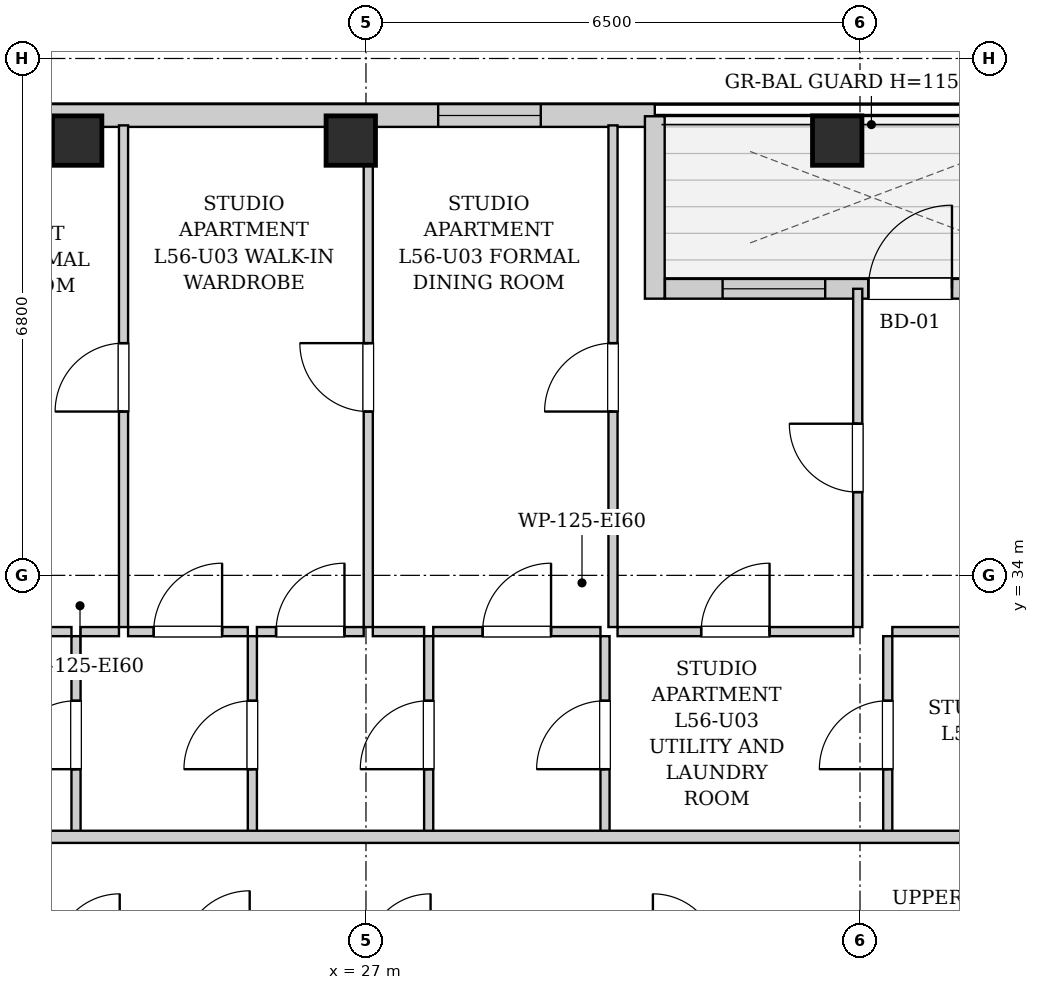
"""IFC4 building model, lengths in metres.
Left out: names, types, materials, properties, quantities, classifications, styles, units other than length and angle.
Written with IfcOpenShell. Run it as: python <this file> out.ifc"""

import sys

from ifc_helpers import new_model, si_unit, direction, frame, frame_2d, origin, origin_2d, place, context, subcontext, project, spatial, rectangle, extrude, element, fill, save


model = new_model("IFC4")
c1 = context("Model", 3, precision=1e-05, world=origin(), true_north=direction((0.0, 1.0)))
c2 = subcontext(c1, "Body", "Model", "MODEL_VIEW")
j1 = project(units=[si_unit("LENGTHUNIT", "METRE"), si_unit("PLANEANGLEUNIT", "RADIAN")], contexts=[c1])
p1 = place(None, origin())
s1 = spatial("IfcSite", under=j1, at=p1, CompositionType="ELEMENT")
p2 = place(p1, origin())
s2 = spatial("IfcBuilding", under=s1, at=p2, CompositionType="ELEMENT")
p3 = place(p2, frame((0.0, 0.0, 194.2)))
s3 = spatial("IfcBuildingStorey", under=s2, at=p3, CompositionType="ELEMENT", Elevation=194.2)
for number, where, z_axis, x_axis in (
    (1, (23.2, 39.72, 0.0), (0.0, 0.0, 1.0), (1.0, 0.0, 0.0)),
    (2, (26.8, 39.72, 0.0), (0.0, 0.0, 1.0), (1.0, 0.0, 0.0)),
    (3, (33.2, 39.72, 0.0), (0.0, 0.0, 1.0), (1.0, 0.0, 0.0)),
):
    element("IfcColumn", number, at=place(p3, frame(where, z_axis=z_axis, x_axis=x_axis)), inside=s3, PredefinedType="COLUMN", context=c2, shape_type="SweptSolid", body=[
        extrude(rectangle(XDim=0.65, YDim=0.65, at=origin_2d()), origin(), (0.0, 0.0, 1.0), 3.3),
    ])
p4 = place(p3, frame((13.1, 40.05, 0.0), z_axis=(0.0, 0.0, 1.0), x_axis=(1.0, 0.0, 0.0)))
e4 = element("IfcWall", 4, at=p4, inside=s3, PredefinedType="SOLIDWALL", context=c2, shape_type="SweptSolid", body=[
    extrude(rectangle(XDim=17.7, YDim=0.3, at=frame_2d((8.85, 0.0))), origin(), (0.0, 0.0, 1.0), 3.04),
])
p5 = place(p4, frame((1.95, 0.0, 0.55)))
e5 = element("IfcOpeningElement", 5, at=p5, cuts=e4, PredefinedType="OPENING", context=c2, shape_type="SweptSolid", body=[
    extrude(rectangle(XDim=1.35, YDim=1.2, at=frame_2d((0.675, 0.6))), frame((0.0, 0.16, 0.0), z_axis=(0.0, -1.0, 0.0), x_axis=(1.0, 0.0, 0.0)), (0.0, 0.0, 1.0), 0.32),
])
p6 = place(p4, frame((5.25, 0.0, 0.55)))
e6 = element("IfcOpeningElement", 6, at=p6, cuts=e4, PredefinedType="OPENING", context=c2, shape_type="SweptSolid", body=[
    extrude(rectangle(XDim=1.35, YDim=1.2, at=frame_2d((0.675, 0.6))), frame((0.0, 0.16, 0.0), z_axis=(0.0, -1.0, 0.0), x_axis=(1.0, 0.0, 0.0)), (0.0, 0.0, 1.0), 0.32),
])
p7 = place(p4, frame((8.05, 0.0, 0.55)))
e7 = element("IfcOpeningElement", 7, at=p7, cuts=e4, PredefinedType="OPENING", context=c2, shape_type="SweptSolid", body=[
    extrude(rectangle(XDim=1.35, YDim=1.2, at=frame_2d((0.675, 0.6))), frame((0.0, 0.16, 0.0), z_axis=(0.0, -1.0, 0.0), x_axis=(1.0, 0.0, 0.0)), (0.0, 0.0, 1.0), 0.32),
])
p8 = place(p4, frame((14.85, 0.0, 0.55)))
e8 = element("IfcOpeningElement", 8, at=p8, cuts=e4, PredefinedType="OPENING", context=c2, shape_type="SweptSolid", body=[
    extrude(rectangle(XDim=1.35, YDim=1.2, at=frame_2d((0.675, 0.6))), frame((0.0, 0.16, 0.0), z_axis=(0.0, -1.0, 0.0), x_axis=(1.0, 0.0, 0.0)), (0.0, 0.0, 1.0), 0.32),
])
p9 = place(p3, frame((30.8, 40.04, 0.0), z_axis=(0.0, 0.0, 1.0), x_axis=(0.0, -1.0, 0.0)))
e9 = element("IfcWall", 9, at=p9, inside=s3, PredefinedType="SOLIDWALL", context=c2, shape_type="SweptSolid", body=[
    extrude(rectangle(XDim=2.4, YDim=0.26, at=frame_2d((1.2, 0.0))), origin(), (0.0, 0.0, 1.0), 3.04),
])
p10 = place(p3, frame((30.934, 37.77, 0.0), z_axis=(0.0, 0.0, 1.0), x_axis=(1.0, 0.0, 0.0)))
e10 = element("IfcWall", 10, at=p10, inside=s3, PredefinedType="SOLIDWALL", context=c2, shape_type="SweptSolid", body=[
    extrude(rectangle(XDim=5.432, YDim=0.26, at=frame_2d((2.716, 0.0))), origin(), (0.0, 0.0, 1.0), 3.04),
])
p11 = place(p10, frame((2.676, 0.0, 0.0)))
e11 = element("IfcOpeningElement", 11, at=p11, cuts=e10, PredefinedType="OPENING", context=c2, shape_type="SweptSolid", body=[
    extrude(rectangle(XDim=1.1, YDim=2.0, at=frame_2d((0.55, 1.0))), frame((0.0, 0.14, 0.0), z_axis=(0.0, -1.0, 0.0), x_axis=(1.0, 0.0, 0.0)), (0.0, 0.0, 1.0), 0.28),
])
p12 = place(p10, frame((0.758, 0.0, 0.55)))
e12 = element("IfcOpeningElement", 12, at=p12, cuts=e10, PredefinedType="OPENING", context=c2, shape_type="SweptSolid", body=[
    extrude(rectangle(XDim=1.35, YDim=1.2, at=frame_2d((0.675, 0.6))), frame((0.0, 0.14, 0.0), z_axis=(0.0, -1.0, 0.0), x_axis=(1.0, 0.0, 0.0)), (0.0, 0.0, 1.0), 0.28),
])
p13 = place(p3, frame((23.185, 30.6, 0.0), z_axis=(0.0, 0.0, 1.0), x_axis=(0.0, 1.0, 0.0)))
e13 = element("IfcWall", 13, at=p13, inside=s3, PredefinedType="PARTITIONING", context=c2, shape_type="SweptSolid", body=[
    extrude(rectangle(XDim=2.6, YDim=0.12, at=frame_2d((1.3, 0.0))), origin(), (0.0, 0.0, 1.0), 3.04),
])
p14 = place(p13, frame((0.85, 0.0, 0.0)))
e14 = element("IfcOpeningElement", 14, at=p14, cuts=e13, PredefinedType="OPENING", context=c2, shape_type="SweptSolid", body=[
    extrude(rectangle(XDim=0.9, YDim=2.05, at=frame_2d((0.45, 1.025))), frame((0.0, 0.07, 0.0), z_axis=(0.0, -1.0, 0.0), x_axis=(1.0, 0.0, 0.0)), (0.0, 0.0, 1.0), 0.14),
])
p15 = place(p3, frame((20.65, 33.26, 0.0), z_axis=(0.0, 0.0, 1.0), x_axis=(1.0, 0.0, 0.0)))
e15 = element("IfcWall", 15, at=p15, inside=s3, PredefinedType="PARTITIONING", context=c2, shape_type="SweptSolid", body=[
    extrude(rectangle(XDim=2.475, YDim=0.12, at=frame_2d((1.238, 0.0))), origin(), (0.0, 0.0, 1.0), 3.04),
])
p16 = place(p15, frame((0.787, 0.0, 0.0)))
e16 = element("IfcOpeningElement", 16, at=p16, cuts=e15, PredefinedType="OPENING", context=c2, shape_type="SweptSolid", body=[
    extrude(rectangle(XDim=0.9, YDim=2.05, at=frame_2d((0.45, 1.025))), frame((0.0, 0.07, 0.0), z_axis=(0.0, -1.0, 0.0), x_axis=(1.0, 0.0, 0.0)), (0.0, 0.0, 1.0), 0.14),
])
p17 = place(p3, frame((25.505, 30.6, 0.0), z_axis=(0.0, 0.0, 1.0), x_axis=(0.0, 1.0, 0.0)))
e17 = element("IfcWall", 17, at=p17, inside=s3, PredefinedType="PARTITIONING", context=c2, shape_type="SweptSolid", body=[
    extrude(rectangle(XDim=2.6, YDim=0.12, at=frame_2d((1.3, 0.0))), origin(), (0.0, 0.0, 1.0), 3.04),
])
p18 = place(p17, frame((0.85, 0.0, 0.0)))
e18 = element("IfcOpeningElement", 18, at=p18, cuts=e17, PredefinedType="OPENING", context=c2, shape_type="SweptSolid", body=[
    extrude(rectangle(XDim=0.9, YDim=2.05, at=frame_2d((0.45, 1.025))), frame((0.0, 0.07, 0.0), z_axis=(0.0, -1.0, 0.0), x_axis=(1.0, 0.0, 0.0)), (0.0, 0.0, 1.0), 0.14),
])
p19 = place(p3, frame((23.245, 33.26, 0.0), z_axis=(0.0, 0.0, 1.0), x_axis=(1.0, 0.0, 0.0)))
e19 = element("IfcWall", 19, at=p19, inside=s3, PredefinedType="PARTITIONING", context=c2, shape_type="SweptSolid", body=[
    extrude(rectangle(XDim=0.505, YDim=0.12, at=frame_2d((0.252, 0.0))), origin(), (0.0, 0.0, 1.0), 3.04),
])
p20 = place(p3, frame((23.87, 33.26, 0.0), z_axis=(0.0, 0.0, 1.0), x_axis=(1.0, 0.0, 0.0)))
e20 = element("IfcWall", 20, at=p20, inside=s3, PredefinedType="PARTITIONING", context=c2, shape_type="SweptSolid", body=[
    extrude(rectangle(XDim=1.575, YDim=0.12, at=frame_2d((0.788, 0.0))), origin(), (0.0, 0.0, 1.0), 3.04),
])
p21 = place(p20, frame((0.337, 0.0, 0.0)))
e21 = element("IfcOpeningElement", 21, at=p21, cuts=e20, PredefinedType="OPENING", context=c2, shape_type="SweptSolid", body=[
    extrude(rectangle(XDim=0.9, YDim=2.05, at=frame_2d((0.45, 1.025))), frame((0.0, 0.07, 0.0), z_axis=(0.0, -1.0, 0.0), x_axis=(1.0, 0.0, 0.0)), (0.0, 0.0, 1.0), 0.14),
])
p22 = place(p3, frame((27.825, 30.6, 0.0), z_axis=(0.0, 0.0, 1.0), x_axis=(0.0, 1.0, 0.0)))
e22 = element("IfcWall", 22, at=p22, inside=s3, PredefinedType="PARTITIONING", context=c2, shape_type="SweptSolid", body=[
    extrude(rectangle(XDim=2.6, YDim=0.12, at=frame_2d((1.3, 0.0))), origin(), (0.0, 0.0, 1.0), 3.04),
])
p23 = place(p22, frame((0.85, 0.0, 0.0)))
e23 = element("IfcOpeningElement", 23, at=p23, cuts=e22, PredefinedType="OPENING", context=c2, shape_type="SweptSolid", body=[
    extrude(rectangle(XDim=0.9, YDim=2.05, at=frame_2d((0.45, 1.025))), frame((0.0, 0.07, 0.0), z_axis=(0.0, -1.0, 0.0), x_axis=(1.0, 0.0, 0.0)), (0.0, 0.0, 1.0), 0.14),
])
p24 = place(p3, frame((25.565, 33.26, 0.0), z_axis=(0.0, 0.0, 1.0), x_axis=(1.0, 0.0, 0.0)))
e24 = element("IfcWall", 24, at=p24, inside=s3, PredefinedType="PARTITIONING", context=c2, shape_type="SweptSolid", body=[
    extrude(rectangle(XDim=1.405, YDim=0.12, at=frame_2d((0.703, 0.0))), origin(), (0.0, 0.0, 1.0), 3.04),
])
p25 = place(p24, frame((0.252, 0.0, 0.0)))
e25 = element("IfcOpeningElement", 25, at=p25, cuts=e24, PredefinedType="OPENING", context=c2, shape_type="SweptSolid", body=[
    extrude(rectangle(XDim=0.9, YDim=2.05, at=frame_2d((0.45, 1.025))), frame((0.0, 0.07, 0.0), z_axis=(0.0, -1.0, 0.0), x_axis=(1.0, 0.0, 0.0)), (0.0, 0.0, 1.0), 0.14),
])
p26 = place(p3, frame((27.09, 33.26, 0.0), z_axis=(0.0, 0.0, 1.0), x_axis=(1.0, 0.0, 0.0)))
e26 = element("IfcWall", 26, at=p26, inside=s3, PredefinedType="PARTITIONING", context=c2, shape_type="SweptSolid", body=[
    extrude(rectangle(XDim=0.675, YDim=0.12, at=frame_2d((0.337, 0.0))), origin(), (0.0, 0.0, 1.0), 3.04),
])
p27 = place(p3, frame((30.145, 30.6, 0.0), z_axis=(0.0, 0.0, 1.0), x_axis=(0.0, 1.0, 0.0)))
e27 = element("IfcWall", 27, at=p27, inside=s3, PredefinedType="PARTITIONING", context=c2, shape_type="SweptSolid", body=[
    extrude(rectangle(XDim=2.6, YDim=0.12, at=frame_2d((1.3, 0.0))), origin(), (0.0, 0.0, 1.0), 3.04),
])
p28 = place(p27, frame((0.85, 0.0, 0.0)))
e28 = element("IfcOpeningElement", 28, at=p28, cuts=e27, PredefinedType="OPENING", context=c2, shape_type="SweptSolid", body=[
    extrude(rectangle(XDim=0.9, YDim=2.05, at=frame_2d((0.45, 1.025))), frame((0.0, 0.07, 0.0), z_axis=(0.0, -1.0, 0.0), x_axis=(1.0, 0.0, 0.0)), (0.0, 0.0, 1.0), 0.14),
])
p29 = place(p3, frame((27.885, 33.26, 0.0), z_axis=(0.0, 0.0, 1.0), x_axis=(1.0, 0.0, 0.0)))
e29 = element("IfcWall", 29, at=p29, inside=s3, PredefinedType="PARTITIONING", context=c2, shape_type="SweptSolid", body=[
    extrude(rectangle(XDim=2.2, YDim=0.12, at=frame_2d((1.1, 0.0))), origin(), (0.0, 0.0, 1.0), 3.04),
])
p30 = place(p29, frame((0.65, 0.0, 0.0)))
e30 = element("IfcOpeningElement", 30, at=p30, cuts=e29, PredefinedType="OPENING", context=c2, shape_type="SweptSolid", body=[
    extrude(rectangle(XDim=0.9, YDim=2.05, at=frame_2d((0.45, 1.025))), frame((0.0, 0.07, 0.0), z_axis=(0.0, -1.0, 0.0), x_axis=(1.0, 0.0, 0.0)), (0.0, 0.0, 1.0), 0.14),
])
p31 = place(p3, frame((33.865, 30.6, 0.0), z_axis=(0.0, 0.0, 1.0), x_axis=(0.0, 1.0, 0.0)))
e31 = element("IfcWall", 31, at=p31, inside=s3, PredefinedType="PARTITIONING", context=c2, shape_type="SweptSolid", body=[
    extrude(rectangle(XDim=2.6, YDim=0.12, at=frame_2d((1.3, 0.0))), origin(), (0.0, 0.0, 1.0), 3.04),
])
p32 = place(p31, frame((0.85, 0.0, 0.0)))
e32 = element("IfcOpeningElement", 32, at=p32, cuts=e31, PredefinedType="OPENING", context=c2, shape_type="SweptSolid", body=[
    extrude(rectangle(XDim=0.9, YDim=2.05, at=frame_2d((0.45, 1.025))), frame((0.0, 0.07, 0.0), z_axis=(0.0, -1.0, 0.0), x_axis=(1.0, 0.0, 0.0)), (0.0, 0.0, 1.0), 0.14),
])
p33 = place(p3, frame((30.31, 33.26, 0.0), z_axis=(0.0, 0.0, 1.0), x_axis=(1.0, 0.0, 0.0)))
e33 = element("IfcWall", 33, at=p33, inside=s3, PredefinedType="PARTITIONING", context=c2, shape_type="SweptSolid", body=[
    extrude(rectangle(XDim=3.1, YDim=0.12, at=frame_2d((1.55, 0.0))), origin(), (0.0, 0.0, 1.0), 3.04),
])
p34 = place(p33, frame((1.1, 0.0, 0.0)))
e34 = element("IfcOpeningElement", 34, at=p34, cuts=e33, PredefinedType="OPENING", context=c2, shape_type="SweptSolid", body=[
    extrude(rectangle(XDim=0.9, YDim=2.05, at=frame_2d((0.45, 1.025))), frame((0.0, 0.07, 0.0), z_axis=(0.0, -1.0, 0.0), x_axis=(1.0, 0.0, 0.0)), (0.0, 0.0, 1.0), 0.14),
])
p35 = place(p3, frame((33.925, 33.26, 0.0), z_axis=(0.0, 0.0, 1.0), x_axis=(1.0, 0.0, 0.0)))
e35 = element("IfcWall", 35, at=p35, inside=s3, PredefinedType="PARTITIONING", context=c2, shape_type="SweptSolid", body=[
    extrude(rectangle(XDim=3.795, YDim=0.12, at=frame_2d((1.897, 0.0))), origin(), (0.0, 0.0, 1.0), 3.04),
])
p36 = place(p35, frame((1.448, 0.0, 0.0)))
e36 = element("IfcOpeningElement", 36, at=p36, cuts=e35, PredefinedType="OPENING", context=c2, shape_type="SweptSolid", body=[
    extrude(rectangle(XDim=0.9, YDim=2.05, at=frame_2d((0.45, 1.025))), frame((0.0, 0.07, 0.0), z_axis=(0.0, -1.0, 0.0), x_axis=(1.0, 0.0, 0.0)), (0.0, 0.0, 1.0), 0.14),
])
p37 = place(p3, frame((23.81, 33.32, 0.0), z_axis=(0.0, 0.0, 1.0), x_axis=(0.0, 1.0, 0.0)))
e37 = element("IfcWall", 37, at=p37, inside=s3, PredefinedType="PARTITIONING", context=c2, shape_type="SweptSolid", body=[
    extrude(rectangle(XDim=6.6, YDim=0.12, at=frame_2d((3.3, 0.0))), origin(), (0.0, 0.0, 1.0), 3.04),
])
p38 = place(p37, frame((2.835, 0.0, 0.0)))
e38 = element("IfcOpeningElement", 38, at=p38, cuts=e37, PredefinedType="OPENING", context=c2, shape_type="SweptSolid", body=[
    extrude(rectangle(XDim=0.9, YDim=2.05, at=frame_2d((0.45, 1.025))), frame((0.0, 0.07, 0.0), z_axis=(0.0, -1.0, 0.0), x_axis=(1.0, 0.0, 0.0)), (0.0, 0.0, 1.0), 0.14),
])
p39 = place(p3, frame((27.03, 33.32, 0.0), z_axis=(0.0, 0.0, 1.0), x_axis=(0.0, 1.0, 0.0)))
e39 = element("IfcWall", 39, at=p39, inside=s3, PredefinedType="PARTITIONING", context=c2, shape_type="SweptSolid", body=[
    extrude(rectangle(XDim=6.6, YDim=0.12, at=frame_2d((3.3, 0.0))), origin(), (0.0, 0.0, 1.0), 3.04),
])
p40 = place(p39, frame((2.835, 0.0, 0.0)))
e40 = element("IfcOpeningElement", 40, at=p40, cuts=e39, PredefinedType="OPENING", context=c2, shape_type="SweptSolid", body=[
    extrude(rectangle(XDim=0.9, YDim=2.05, at=frame_2d((0.45, 1.025))), frame((0.0, 0.07, 0.0), z_axis=(0.0, -1.0, 0.0), x_axis=(1.0, 0.0, 0.0)), (0.0, 0.0, 1.0), 0.14),
])
p41 = place(p3, frame((30.25, 33.32, 0.0), z_axis=(0.0, 0.0, 1.0), x_axis=(0.0, 1.0, 0.0)))
e41 = element("IfcWall", 41, at=p41, inside=s3, PredefinedType="PARTITIONING", context=c2, shape_type="SweptSolid", body=[
    extrude(rectangle(XDim=6.6, YDim=0.12, at=frame_2d((3.3, 0.0))), origin(), (0.0, 0.0, 1.0), 3.04),
])
p42 = place(p41, frame((2.835, 0.0, 0.0)))
e42 = element("IfcOpeningElement", 42, at=p42, cuts=e41, PredefinedType="OPENING", context=c2, shape_type="SweptSolid", body=[
    extrude(rectangle(XDim=0.9, YDim=2.05, at=frame_2d((0.45, 1.025))), frame((0.0, 0.07, 0.0), z_axis=(0.0, -1.0, 0.0), x_axis=(1.0, 0.0, 0.0)), (0.0, 0.0, 1.0), 0.14),
])
p43 = place(p3, frame((33.47, 33.32, 0.0), z_axis=(0.0, 0.0, 1.0), x_axis=(0.0, 1.0, 0.0)))
e43 = element("IfcWall", 43, at=p43, inside=s3, PredefinedType="PARTITIONING", context=c2, shape_type="SweptSolid", body=[
    extrude(rectangle(XDim=4.45, YDim=0.12, at=frame_2d((2.225, 0.0))), origin(), (0.0, 0.0, 1.0), 3.04),
])
p44 = place(p43, frame((1.775, 0.0, 0.0)))
e44 = element("IfcOpeningElement", 44, at=p44, cuts=e43, PredefinedType="OPENING", context=c2, shape_type="SweptSolid", body=[
    extrude(rectangle(XDim=0.9, YDim=2.05, at=frame_2d((0.45, 1.025))), frame((0.0, 0.07, 0.0), z_axis=(0.0, -1.0, 0.0), x_axis=(1.0, 0.0, 0.0)), (0.0, 0.0, 1.0), 0.14),
])
p45 = place(p3, frame((13.15, 30.56, 0.0), z_axis=(0.0, 0.0, 1.0), x_axis=(1.0, 0.0, 0.0)))
e45 = element("IfcWall", 45, at=p45, inside=s3, PredefinedType="PARTITIONING", context=c2, shape_type="SweptSolid", body=[
    extrude(rectangle(XDim=24.6, YDim=0.16, at=frame_2d((12.3, 0.0))), origin(), (0.0, 0.0, 1.0), 3.04),
])
p46 = place(p45, frame((3.115, 0.0, 0.0)))
e46 = element("IfcOpeningElement", 46, at=p46, cuts=e45, PredefinedType="OPENING", context=c2, shape_type="SweptSolid", body=[
    extrude(rectangle(XDim=0.95, YDim=2.1, at=frame_2d((0.475, 1.05))), frame((0.0, 0.09, 0.0), z_axis=(0.0, -1.0, 0.0), x_axis=(1.0, 0.0, 0.0)), (0.0, 0.0, 1.0), 0.18),
])
p47 = place(p14, origin())
e47 = element("IfcDoor", 47, at=p47, inside=s3, OperationType="SINGLE_SWING_LEFT", PredefinedType="DOOR", context=c2, shape_type="SweptSolid", body=[
    extrude(rectangle(XDim=0.9, YDim=2.05, at=frame_2d((0.45, 1.025))), frame((0.0, 0.025, 0.0), z_axis=(0.0, -1.0, 0.0), x_axis=(1.0, 0.0, 0.0)), (0.0, 0.0, 1.0), 0.05),
])
fill(e14, e47)
p48 = place(p18, origin())
e48 = element("IfcDoor", 48, at=p48, inside=s3, OperationType="SINGLE_SWING_LEFT", PredefinedType="DOOR", context=c2, shape_type="SweptSolid", body=[
    extrude(rectangle(XDim=0.9, YDim=2.05, at=frame_2d((0.45, 1.025))), frame((0.0, 0.025, 0.0), z_axis=(0.0, -1.0, 0.0), x_axis=(1.0, 0.0, 0.0)), (0.0, 0.0, 1.0), 0.05),
])
fill(e18, e48)
p49 = place(p21, origin())
e49 = element("IfcDoor", 49, at=p49, inside=s3, OperationType="SINGLE_SWING_RIGHT", PredefinedType="DOOR", context=c2, shape_type="SweptSolid", body=[
    extrude(rectangle(XDim=0.9, YDim=2.05, at=frame_2d((0.45, 1.025))), frame((0.0, 0.025, 0.0), z_axis=(0.0, -1.0, 0.0), x_axis=(1.0, 0.0, 0.0)), (0.0, 0.0, 1.0), 0.05),
])
fill(e21, e49)
p50 = place(p23, origin())
e50 = element("IfcDoor", 50, at=p50, inside=s3, OperationType="SINGLE_SWING_LEFT", PredefinedType="DOOR", context=c2, shape_type="SweptSolid", body=[
    extrude(rectangle(XDim=0.9, YDim=2.05, at=frame_2d((0.45, 1.025))), frame((0.0, 0.025, 0.0), z_axis=(0.0, -1.0, 0.0), x_axis=(1.0, 0.0, 0.0)), (0.0, 0.0, 1.0), 0.05),
])
fill(e23, e50)
p51 = place(p25, origin())
e51 = element("IfcDoor", 51, at=p51, inside=s3, OperationType="SINGLE_SWING_RIGHT", PredefinedType="DOOR", context=c2, shape_type="SweptSolid", body=[
    extrude(rectangle(XDim=0.9, YDim=2.05, at=frame_2d((0.45, 1.025))), frame((0.0, 0.025, 0.0), z_axis=(0.0, -1.0, 0.0), x_axis=(1.0, 0.0, 0.0)), (0.0, 0.0, 1.0), 0.05),
])
fill(e25, e51)
p52 = place(p28, origin())
e52 = element("IfcDoor", 52, at=p52, inside=s3, OperationType="SINGLE_SWING_LEFT", PredefinedType="DOOR", context=c2, shape_type="SweptSolid", body=[
    extrude(rectangle(XDim=0.9, YDim=2.05, at=frame_2d((0.45, 1.025))), frame((0.0, 0.025, 0.0), z_axis=(0.0, -1.0, 0.0), x_axis=(1.0, 0.0, 0.0)), (0.0, 0.0, 1.0), 0.05),
])
fill(e28, e52)
p53 = place(p30, origin())
e53 = element("IfcDoor", 53, at=p53, inside=s3, OperationType="SINGLE_SWING_RIGHT", PredefinedType="DOOR", context=c2, shape_type="SweptSolid", body=[
    extrude(rectangle(XDim=0.9, YDim=2.05, at=frame_2d((0.45, 1.025))), frame((0.0, 0.025, 0.0), z_axis=(0.0, -1.0, 0.0), x_axis=(1.0, 0.0, 0.0)), (0.0, 0.0, 1.0), 0.05),
])
fill(e30, e53)
p54 = place(p32, origin())
e54 = element("IfcDoor", 54, at=p54, inside=s3, OperationType="SINGLE_SWING_LEFT", PredefinedType="DOOR", context=c2, shape_type="SweptSolid", body=[
    extrude(rectangle(XDim=0.9, YDim=2.05, at=frame_2d((0.45, 1.025))), frame((0.0, 0.025, 0.0), z_axis=(0.0, -1.0, 0.0), x_axis=(1.0, 0.0, 0.0)), (0.0, 0.0, 1.0), 0.05),
])
fill(e32, e54)
p55 = place(p34, origin())
e55 = element("IfcDoor", 55, at=p55, inside=s3, OperationType="SINGLE_SWING_RIGHT", PredefinedType="DOOR", context=c2, shape_type="SweptSolid", body=[
    extrude(rectangle(XDim=0.9, YDim=2.05, at=frame_2d((0.45, 1.025))), frame((0.0, 0.025, 0.0), z_axis=(0.0, -1.0, 0.0), x_axis=(1.0, 0.0, 0.0)), (0.0, 0.0, 1.0), 0.05),
])
fill(e34, e55)
p56 = place(p38, origin())
e56 = element("IfcDoor", 56, at=p56, inside=s3, OperationType="SINGLE_SWING_LEFT", PredefinedType="DOOR", context=c2, shape_type="SweptSolid", body=[
    extrude(rectangle(XDim=0.9, YDim=2.05, at=frame_2d((0.45, 1.025))), frame((0.0, 0.025, 0.0), z_axis=(0.0, -1.0, 0.0), x_axis=(1.0, 0.0, 0.0)), (0.0, 0.0, 1.0), 0.05),
])
fill(e38, e56)
p57 = place(p40, origin())
e57 = element("IfcDoor", 57, at=p57, inside=s3, OperationType="SINGLE_SWING_RIGHT", PredefinedType="DOOR", context=c2, shape_type="SweptSolid", body=[
    extrude(rectangle(XDim=0.9, YDim=2.05, at=frame_2d((0.45, 1.025))), frame((0.0, 0.025, 0.0), z_axis=(0.0, -1.0, 0.0), x_axis=(1.0, 0.0, 0.0)), (0.0, 0.0, 1.0), 0.05),
])
fill(e40, e57)
p58 = place(p42, origin())
e58 = element("IfcDoor", 58, at=p58, inside=s3, OperationType="SINGLE_SWING_LEFT", PredefinedType="DOOR", context=c2, shape_type="SweptSolid", body=[
    extrude(rectangle(XDim=0.9, YDim=2.05, at=frame_2d((0.45, 1.025))), frame((0.0, 0.025, 0.0), z_axis=(0.0, -1.0, 0.0), x_axis=(1.0, 0.0, 0.0)), (0.0, 0.0, 1.0), 0.05),
])
fill(e42, e58)
p59 = place(p44, origin())
e59 = element("IfcDoor", 59, at=p59, inside=s3, OperationType="SINGLE_SWING_RIGHT", PredefinedType="DOOR", context=c2, shape_type="SweptSolid", body=[
    extrude(rectangle(XDim=0.9, YDim=2.05, at=frame_2d((0.45, 1.025))), frame((0.0, 0.025, 0.0), z_axis=(0.0, -1.0, 0.0), x_axis=(1.0, 0.0, 0.0)), (0.0, 0.0, 1.0), 0.05),
])
fill(e44, e59)
p60 = place(p11, origin())
e60 = element("IfcDoor", 60, at=p60, inside=s3, OperationType="SINGLE_SWING_RIGHT", PredefinedType="DOOR", context=c2, shape_type="SweptSolid", body=[
    extrude(rectangle(XDim=1.1, YDim=2.0, at=frame_2d((0.55, 1.0))), frame((0.0, 0.025, 0.0), z_axis=(0.0, -1.0, 0.0), x_axis=(1.0, 0.0, 0.0)), (0.0, 0.0, 1.0), 0.05),
])
fill(e11, e60)
p61 = place(p8, origin())
e61 = element("IfcWindow", 61, at=p61, inside=s3, PartitioningType="SINGLE_PANEL", PredefinedType="WINDOW", context=c2, shape_type="SweptSolid", body=[
    extrude(rectangle(XDim=1.35, YDim=1.2, at=frame_2d((0.675, 0.6))), frame((0.0, 0.03, 0.0), z_axis=(0.0, -1.0, 0.0), x_axis=(1.0, 0.0, 0.0)), (0.0, 0.0, 1.0), 0.06),
])
fill(e8, e61)
p62 = place(p12, origin())
e62 = element("IfcWindow", 62, at=p62, inside=s3, PartitioningType="SINGLE_PANEL", PredefinedType="WINDOW", context=c2, shape_type="SweptSolid", body=[
    extrude(rectangle(XDim=1.35, YDim=1.2, at=frame_2d((0.675, 0.6))), frame((0.0, 0.03, 0.0), z_axis=(0.0, -1.0, 0.0), x_axis=(1.0, 0.0, 0.0)), (0.0, 0.0, 1.0), 0.06),
])
fill(e12, e62)
save(model, sys.argv[1])
